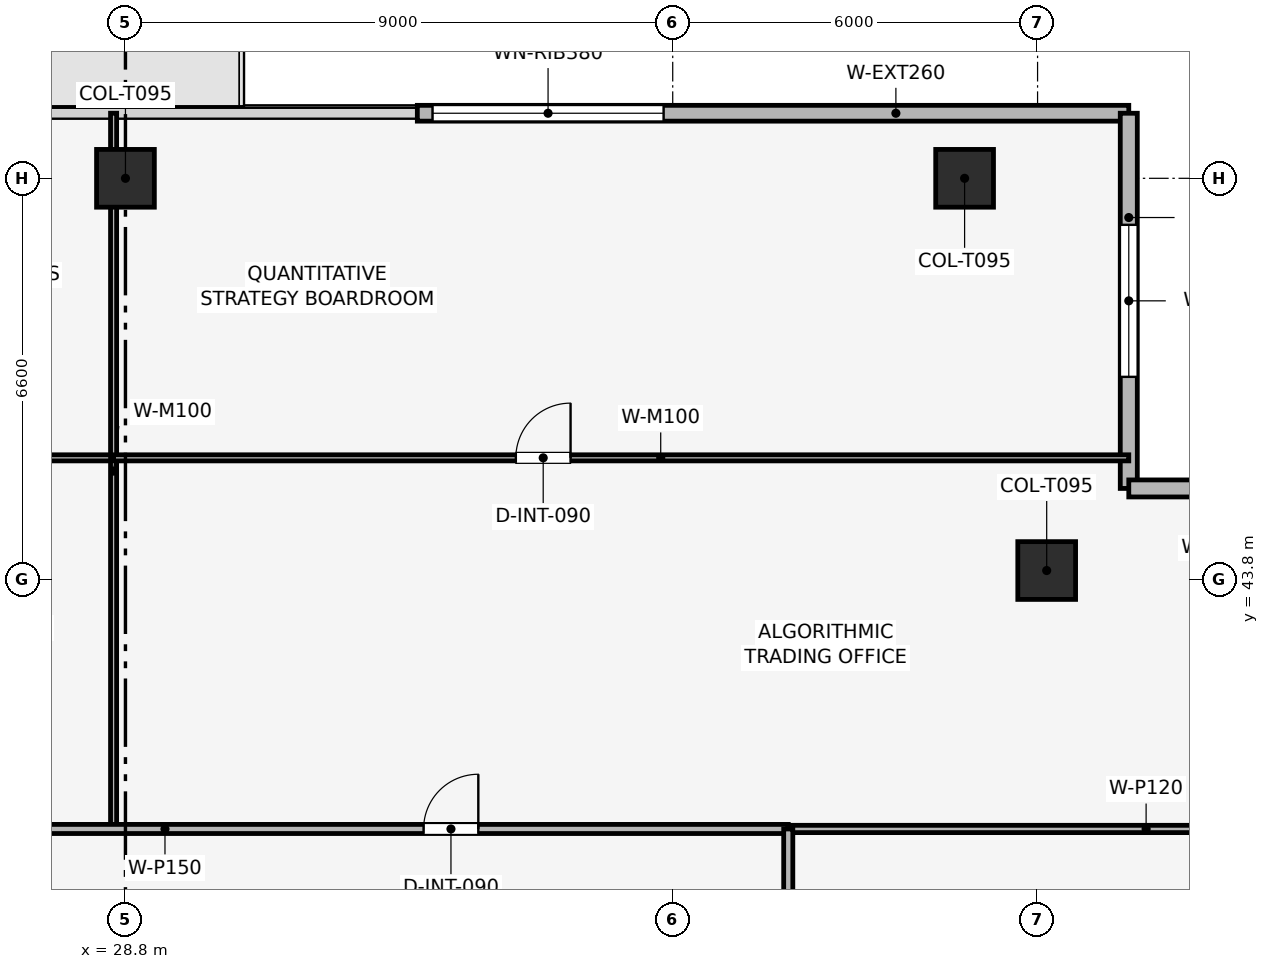
"""IFC4 building model, lengths in metres.
Left out: names, types, materials, properties, quantities, classifications, styles, units other than length and angle.
Written with IfcOpenShell. Run it as: python <this file> out.ifc"""

import sys

from ifc_helpers import new_model, si_unit, direction, frame, frame_2d, origin, origin_2d, place, context, subcontext, project, spatial, rectangle, extrude, element, fill, save


model = new_model("IFC4")
c1 = context("Model", 3, precision=1e-05, world=origin(), true_north=direction((0.0, 1.0)))
c2 = subcontext(c1, "Body", "Model", "MODEL_VIEW")
j1 = project(units=[si_unit("LENGTHUNIT", "METRE"), si_unit("PLANEANGLEUNIT", "RADIAN")], contexts=[c1])
p1 = place(None, origin())
s1 = spatial("IfcSite", under=j1, at=p1, CompositionType="ELEMENT")
p2 = place(p1, origin())
s2 = spatial("IfcBuilding", under=s1, at=p2, CompositionType="ELEMENT")
p3 = place(p2, frame((0.0, 0.0, 299.25)))
s3 = spatial("IfcBuildingStorey", under=s2, at=p3, CompositionType="ELEMENT", Elevation=299.25)
for number, where, z_axis, x_axis in (
    (1, (42.6, 50.4, 0.003), (0.0, 0.0, 1.0), (1.0, 0.0, 0.0)),
    (2, (28.8, 50.4, 0.003), (0.0, 0.0, 1.0), (1.0, 0.0, 0.0)),
    (3, (43.95, 43.95, 0.003), (0.0, 0.0, 1.0), (1.0, 0.0, 0.0)),
):
    element("IfcColumn", number, at=place(p3, frame(where, z_axis=z_axis, x_axis=x_axis)), inside=s3, PredefinedType="COLUMN", context=c2, shape_type="SweptSolid", body=[
        extrude(rectangle(XDim=0.95, YDim=0.95, at=origin_2d()), origin(), (0.0, 0.0, 1.0), 3.504),
    ])
p4 = place(p3, frame((33.6, 51.47, 0.0), z_axis=(0.0, 0.0, 1.0), x_axis=(1.0, 0.0, 0.0)))
e4 = element("IfcWall", 4, at=p4, inside=s3, PredefinedType="SOLIDWALL", context=c2, shape_type="SweptSolid", body=[
    extrude(rectangle(XDim=11.7, YDim=0.26, at=frame_2d((5.85, 0.0))), origin(), (0.0, 0.0, 1.0), 3.51),
])
p5 = place(p4, frame((0.25, 0.0, 0.9)))
e5 = element("IfcOpeningElement", 5, at=p5, cuts=e4, PredefinedType="OPENING", context=c2, shape_type="SweptSolid", body=[
    extrude(rectangle(XDim=3.8, YDim=1.9, at=frame_2d((1.9, 0.95))), frame((0.0, 0.14, 0.0), z_axis=(0.0, -1.0, 0.0), x_axis=(1.0, 0.0, 0.0)), (0.0, 0.0, 1.0), 0.28),
])
p6 = place(p3, frame((45.3, 51.47, 0.0), z_axis=(0.0, 0.0, 1.0), x_axis=(0.0, -1.0, 0.0)))
e6 = element("IfcWall", 6, at=p6, inside=s3, PredefinedType="SOLIDWALL", context=c2, shape_type="SweptSolid", body=[
    extrude(rectangle(XDim=6.17, YDim=0.28, at=frame_2d((3.085, 0.0))), origin(), (0.0, 0.0, 1.0), 3.51),
])
p7 = place(p6, frame((1.835, 0.0, 0.9)))
e7 = element("IfcOpeningElement", 7, at=p7, cuts=e6, PredefinedType="OPENING", context=c2, shape_type="SweptSolid", body=[
    extrude(rectangle(XDim=2.5, YDim=1.9, at=frame_2d((1.25, 0.95))), frame((0.0, 0.15, 0.0), z_axis=(0.0, -1.0, 0.0), x_axis=(1.0, 0.0, 0.0)), (0.0, 0.0, 1.0), 0.3),
])
p8 = place(p3, frame((45.3, 45.3, 0.0), z_axis=(0.0, 0.0, 1.0), x_axis=(1.0, 0.0, 0.0)))
e8 = element("IfcWall", 8, at=p8, inside=s3, PredefinedType="SOLIDWALL", context=c2, shape_type="SweptSolid", body=[
    extrude(rectangle(XDim=6.17, YDim=0.28, at=frame_2d((3.085, 0.0))), origin(), (0.0, 0.0, 1.0), 3.51),
])
p9 = place(p8, frame((1.835, 0.0, 0.9)))
e9 = element("IfcOpeningElement", 9, at=p9, cuts=e8, PredefinedType="OPENING", context=c2, shape_type="SweptSolid", body=[
    extrude(rectangle(XDim=2.5, YDim=1.9, at=frame_2d((1.25, 0.95))), frame((0.0, 0.15, 0.0), z_axis=(0.0, -1.0, 0.0), x_axis=(1.0, 0.0, 0.0)), (0.0, 0.0, 1.0), 0.3),
])
p10 = place(p3, frame((20.2, 45.803, 0.0), z_axis=(0.0, 0.0, 1.0), x_axis=(1.0, 0.0, 0.0)))
e10 = element("IfcWall", 10, at=p10, inside=s3, PredefinedType="MOVABLE", context=c2, shape_type="SweptSolid", body=[
    extrude(rectangle(XDim=8.405, YDim=0.1, at=frame_2d((4.203, 0.0))), origin(), (0.0, 0.0, 1.0), 3.095),
])
p11 = place(p10, frame((1.384, 0.0, 0.0)))
e11 = element("IfcOpeningElement", 11, at=p11, cuts=e10, PredefinedType="OPENING", context=c2, shape_type="SweptSolid", body=[
    extrude(rectangle(XDim=0.9, YDim=2.1, at=frame_2d((0.45, 1.05))), frame((0.0, 0.06, 0.0), z_axis=(0.0, -1.0, 0.0), x_axis=(1.0, 0.0, 0.0)), (0.0, 0.0, 1.0), 0.12),
])
p12 = place(p3, frame((28.605, 39.7, 0.0), z_axis=(0.0, 0.0, 1.0), x_axis=(0.0, 1.0, 0.0)))
e12 = element("IfcWall", 12, at=p12, inside=s3, PredefinedType="MOVABLE", context=c2, shape_type="SweptSolid", body=[
    extrude(rectangle(XDim=11.77, YDim=0.1, at=frame_2d((5.885, 0.0))), origin(), (0.0, 0.0, 1.0), 2.995),
])
p13 = place(p3, frame((28.605, 45.803, 0.0), z_axis=(0.0, 0.0, 1.0), x_axis=(1.0, 0.0, 0.0)))
e13 = element("IfcWall", 13, at=p13, inside=s3, PredefinedType="MOVABLE", context=c2, shape_type="SweptSolid", body=[
    extrude(rectangle(XDim=16.695, YDim=0.1, at=frame_2d((8.348, 0.0))), origin(), (0.0, 0.0, 1.0), 3.095),
])
p14 = place(p13, frame((6.615, 0.0, 0.0)))
e14 = element("IfcOpeningElement", 14, at=p14, cuts=e13, PredefinedType="OPENING", context=c2, shape_type="SweptSolid", body=[
    extrude(rectangle(XDim=0.9, YDim=2.1, at=frame_2d((0.45, 1.05))), frame((0.0, 0.06, 0.0), z_axis=(0.0, -1.0, 0.0), x_axis=(1.0, 0.0, 0.0)), (0.0, 0.0, 1.0), 0.12),
])
p15 = place(p3, frame((39.7, 39.7, 0.0), z_axis=(0.0, 0.0, 1.0), x_axis=(1.0, 0.0, 0.0)))
e15 = element("IfcWall", 15, at=p15, inside=s3, PredefinedType="PARTITIONING", context=c2, shape_type="SweptSolid", body=[
    extrude(rectangle(XDim=11.77, YDim=0.12, at=frame_2d((5.885, 0.0))), origin(), (0.0, 0.0, 1.0), 3.095),
])
p16 = place(p3, frame((17.9, 39.7, 0.0), z_axis=(0.0, 0.0, 1.0), x_axis=(1.0, 0.0, 0.0)))
e16 = element("IfcWall", 16, at=p16, inside=s3, PredefinedType="PARTITIONING", context=c2, shape_type="SweptSolid", body=[
    extrude(rectangle(XDim=21.8, YDim=0.15, at=frame_2d((10.9, 0.0))), origin(), (0.0, 0.0, 1.0), 3.095),
])
p17 = place(p16, frame((0.7, 0.0, 0.0)))
e17 = element("IfcOpeningElement", 17, at=p17, cuts=e16, PredefinedType="OPENING", context=c2, shape_type="SweptSolid", body=[
    extrude(rectangle(XDim=0.9, YDim=2.1, at=frame_2d((0.45, 1.05))), frame((0.0, 0.085, 0.0), z_axis=(0.0, -1.0, 0.0), x_axis=(1.0, 0.0, 0.0)), (0.0, 0.0, 1.0), 0.17),
])
p18 = place(p16, frame((6.053, 0.0, 0.0)))
e18 = element("IfcOpeningElement", 18, at=p18, cuts=e16, PredefinedType="OPENING", context=c2, shape_type="SweptSolid", body=[
    extrude(rectangle(XDim=0.9, YDim=2.1, at=frame_2d((0.45, 1.05))), frame((0.0, 0.085, 0.0), z_axis=(0.0, -1.0, 0.0), x_axis=(1.0, 0.0, 0.0)), (0.0, 0.0, 1.0), 0.17),
])
p19 = place(p16, frame((15.803, 0.0, 0.0)))
e19 = element("IfcOpeningElement", 19, at=p19, cuts=e16, PredefinedType="OPENING", context=c2, shape_type="SweptSolid", body=[
    extrude(rectangle(XDim=0.9, YDim=2.1, at=frame_2d((0.45, 1.05))), frame((0.0, 0.085, 0.0), z_axis=(0.0, -1.0, 0.0), x_axis=(1.0, 0.0, 0.0)), (0.0, 0.0, 1.0), 0.17),
])
p20 = place(p3, frame((39.7, 24.4, 0.0), z_axis=(0.0, 0.0, 1.0), x_axis=(0.0, 1.0, 0.0)))
e20 = element("IfcWall", 20, at=p20, inside=s3, PredefinedType="PARTITIONING", context=c2, shape_type="SweptSolid", body=[
    extrude(rectangle(XDim=15.3, YDim=0.15, at=frame_2d((7.65, 0.0))), origin(), (0.0, 0.0, 1.0), 3.095),
])
p21 = place(p20, frame((7.2, 0.0, 0.0)))
e21 = element("IfcOpeningElement", 21, at=p21, cuts=e20, PredefinedType="OPENING", context=c2, shape_type="SweptSolid", body=[
    extrude(rectangle(XDim=0.9, YDim=2.1, at=frame_2d((0.45, 1.05))), frame((0.0, 0.085, 0.0), z_axis=(0.0, -1.0, 0.0), x_axis=(1.0, 0.0, 0.0)), (0.0, 0.0, 1.0), 0.17),
])
p22 = place(p5, origin())
e22 = element("IfcWindow", 22, at=p22, inside=s3, PartitioningType="SINGLE_PANEL", PredefinedType="WINDOW", context=c2, shape_type="SweptSolid", body=[
    extrude(rectangle(XDim=3.8, YDim=1.9, at=frame_2d((1.9, 0.95))), frame((0.0, 0.03, 0.0), z_axis=(0.0, -1.0, 0.0), x_axis=(1.0, 0.0, 0.0)), (0.0, 0.0, 1.0), 0.06),
])
fill(e5, e22)
p23 = place(p7, origin())
e23 = element("IfcWindow", 23, at=p23, inside=s3, PartitioningType="SINGLE_PANEL", PredefinedType="WINDOW", context=c2, shape_type="SweptSolid", body=[
    extrude(rectangle(XDim=2.5, YDim=1.9, at=frame_2d((1.25, 0.95))), frame((0.0, 0.03, 0.0), z_axis=(0.0, -1.0, 0.0), x_axis=(1.0, 0.0, 0.0)), (0.0, 0.0, 1.0), 0.06),
])
fill(e7, e23)
p24 = place(p14, origin())
e24 = element("IfcDoor", 24, at=p24, inside=s3, OperationType="SINGLE_SWING_RIGHT", PredefinedType="DOOR", context=c2, shape_type="SweptSolid", body=[
    extrude(rectangle(XDim=0.9, YDim=2.1, at=frame_2d((0.45, 1.05))), frame((0.0, 0.025, 0.0), z_axis=(0.0, -1.0, 0.0), x_axis=(1.0, 0.0, 0.0)), (0.0, 0.0, 1.0), 0.05),
])
fill(e14, e24)
p25 = place(p19, origin())
e25 = element("IfcDoor", 25, at=p25, inside=s3, OperationType="SINGLE_SWING_RIGHT", PredefinedType="DOOR", context=c2, shape_type="SweptSolid", body=[
    extrude(rectangle(XDim=0.9, YDim=2.1, at=frame_2d((0.45, 1.05))), frame((0.0, 0.025, 0.0), z_axis=(0.0, -1.0, 0.0), x_axis=(1.0, 0.0, 0.0)), (0.0, 0.0, 1.0), 0.05),
])
fill(e19, e25)
save(model, sys.argv[1])
